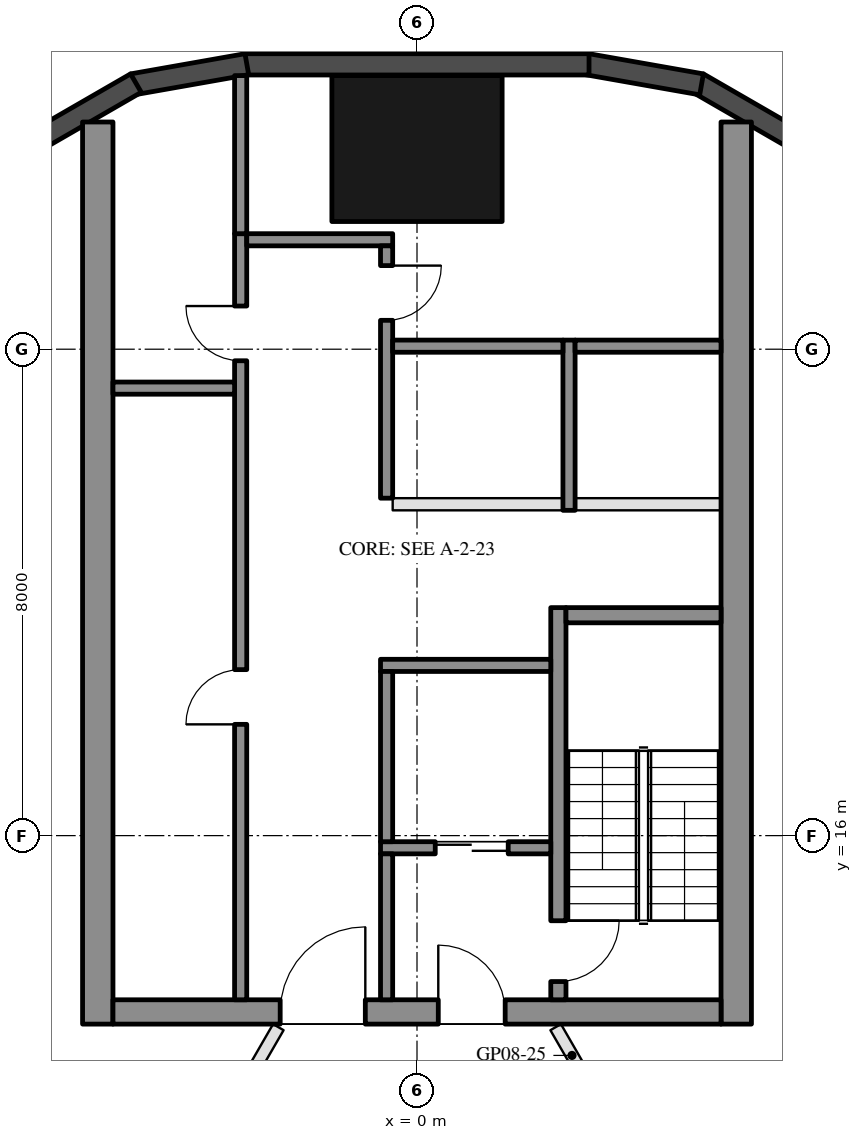
"""IFC4 building model, lengths in metres.
Left out: names, types, materials, properties, quantities, classifications, styles, units other than length and angle.
Written with IfcOpenShell. Run it as: python <this file> out.ifc"""

import sys

from ifc_helpers import new_model, si_unit, direction, frame, frame_2d, origin, origin_2d, place, context, subcontext, project, spatial, rectangle, hollow_rectangle, extrude, element, fill, save


model = new_model("IFC4")
c1 = context("Model", 3, precision=1e-05, world=origin(), true_north=direction((0.0, 1.0)))
c2 = subcontext(c1, "Body", "Model", "MODEL_VIEW")
j1 = project(units=[si_unit("LENGTHUNIT", "METRE"), si_unit("PLANEANGLEUNIT", "RADIAN")], contexts=[c1])
p1 = place(None, origin())
s1 = spatial("IfcSite", under=j1, at=p1, CompositionType="ELEMENT")
p2 = place(p1, origin())
s2 = spatial("IfcBuilding", under=s1, at=p2, CompositionType="ELEMENT")
p3 = place(p2, frame((0.0, 0.0, 105.7)))
s3 = spatial("IfcBuildingStorey", under=s2, at=p3, CompositionType="ELEMENT", Elevation=105.7)
p4 = place(p3, frame((0.0, 27.3, 0.0), z_axis=(0.0, 0.0, 1.0), x_axis=(1.0, 0.0, 0.0)))
e1 = element("IfcColumn", 1, at=p4, inside=s3, PredefinedType="COLUMN", context=c2, shape_type="SweptSolid", body=[
    extrude(hollow_rectangle(XDim=2.8, YDim=2.4, WallThickness=0.07, at=origin_2d()), origin(), (0.0, 0.0, 1.0), 3.7),
])
for number, where, z_axis, x_axis in (
    (2, (6.277, 27.422, 0.0), (0.0, 0.0, 1.0), (-0.866, 0.5, 0.0)),
    (3, (4.68, 28.356, 0.0), (0.0, 0.0, 1.0), (-0.985, 0.174, 0.0)),
):
    element("IfcWall", number, at=place(p3, frame(where, z_axis=z_axis, x_axis=x_axis)), inside=s3, PredefinedType="SOLIDWALL", context=c2, shape_type="SweptSolid", body=[
        extrude(rectangle(XDim=1.91, YDim=0.35, at=frame_2d((0.955, 0.0))), origin(), (0.0, 0.0, 1.0), 3.55),
    ])
p5 = place(p3, frame((2.829, 28.685, 0.0), z_axis=(0.0, 0.0, 1.0), x_axis=(-1.0, 0.0, 0.0)))
e4 = element("IfcWall", 4, at=p5, inside=s3, PredefinedType="SOLIDWALL", context=c2, shape_type="SweptSolid", body=[
    extrude(rectangle(XDim=5.658, YDim=0.35, at=frame_2d((2.829, 0.0))), origin(), (0.0, 0.0, 1.0), 3.55),
])
for number, where, z_axis, x_axis in (
    (5, (-2.799, 28.688, 0.0), (0.0, 0.0, 1.0), (-0.985, -0.174, 0.0)),
    (6, (-4.623, 28.377, 0.0), (0.0, 0.0, 1.0), (-0.866, -0.5, 0.0)),
):
    element("IfcWall", number, at=place(p3, frame(where, z_axis=z_axis, x_axis=x_axis)), inside=s3, PredefinedType="SOLIDWALL", context=c2, shape_type="SweptSolid", body=[
        extrude(rectangle(XDim=1.91, YDim=0.35, at=frame_2d((0.955, 0.0))), origin(), (0.0, 0.0, 1.0), 3.55),
    ])
for number, where, z_axis, x_axis in (
    (7, (5.25, 12.9, 0.0), (0.0, 0.0, 1.0), (0.0, 1.0, 0.0)),
    (8, (-5.25, 12.9, 0.0), (0.0, 0.0, 1.0), (0.0, 1.0, 0.0)),
):
    element("IfcWall", number, at=place(p3, frame(where, z_axis=z_axis, x_axis=x_axis)), inside=s3, PredefinedType="SHEAR", context=c2, shape_type="SweptSolid", body=[
        extrude(rectangle(XDim=14.837, YDim=0.5, at=frame_2d((7.418, 0.0))), origin(), (0.0, 0.0, 1.0), 3.5),
    ])
p6 = place(p3, frame((5.0, 13.1, 0.0), z_axis=(0.0, 0.0, 1.0), x_axis=(-1.0, 0.0, 0.0)))
e9 = element("IfcWall", 9, at=p6, inside=s3, PredefinedType="SHEAR", context=c2, shape_type="SweptSolid", body=[
    extrude(rectangle(XDim=10.0, YDim=0.4, at=frame_2d((5.0, 0.0))), origin(), (0.0, 0.0, 1.0), 3.5),
])
p7 = place(p6, frame((3.55, 0.0, 0.0)))
e10 = element("IfcOpeningElement", 10, at=p7, cuts=e9, PredefinedType="OPENING", context=c2, shape_type="SweptSolid", body=[
    extrude(rectangle(XDim=1.1, YDim=2.1, at=frame_2d((0.55, 1.05))), frame((0.0, 0.21, 0.0), z_axis=(0.0, -1.0, 0.0), x_axis=(1.0, 0.0, 0.0)), (0.0, 0.0, 1.0), 0.42),
])
p8 = place(p6, frame((5.85, 0.0, 0.0)))
e11 = element("IfcOpeningElement", 11, at=p8, cuts=e9, PredefinedType="OPENING", context=c2, shape_type="SweptSolid", body=[
    extrude(rectangle(XDim=1.4, YDim=2.1, at=frame_2d((0.7, 1.05))), frame((0.0, 0.21, 0.0), z_axis=(0.0, -1.0, 0.0), x_axis=(1.0, 0.0, 0.0)), (0.0, 0.0, 1.0), 0.42),
])
p9 = place(p3, frame((2.325, 13.3, 0.0), z_axis=(0.0, 0.0, 1.0), x_axis=(0.0, 1.0, 0.0)))
e12 = element("IfcWall", 12, at=p9, inside=s3, PredefinedType="SHEAR", context=c2, shape_type="SweptSolid", body=[
    extrude(rectangle(XDim=6.45, YDim=0.25, at=frame_2d((3.225, 0.0))), origin(), (0.0, 0.0, 1.0), 3.5),
])
p10 = place(p9, frame((0.3, 0.0, 0.0)))
e13 = element("IfcOpeningElement", 13, at=p10, cuts=e12, PredefinedType="OPENING", context=c2, shape_type="SweptSolid", body=[
    extrude(rectangle(XDim=1.0, YDim=2.1, at=frame_2d((0.5, 1.05))), frame((0.0, 0.135, 0.0), z_axis=(0.0, -1.0, 0.0), x_axis=(1.0, 0.0, 0.0)), (0.0, 0.0, 1.0), 0.27),
])
p11 = place(p3, frame((5.0, 19.625, 0.0), z_axis=(0.0, 0.0, 1.0), x_axis=(-1.0, 0.0, 0.0)))
e14 = element("IfcWall", 14, at=p11, inside=s3, PredefinedType="SHEAR", context=c2, shape_type="SweptSolid", body=[
    extrude(rectangle(XDim=2.55, YDim=0.25, at=frame_2d((1.275, 0.0))), origin(), (0.0, 0.0, 1.0), 3.5),
])
p12 = place(p3, frame((2.2, 18.8, 0.0), z_axis=(0.0, 0.0, 1.0), x_axis=(-1.0, 0.0, 0.0)))
e15 = element("IfcWall", 15, at=p12, inside=s3, PredefinedType="SHEAR", context=c2, shape_type="SweptSolid", body=[
    extrude(rectangle(XDim=2.8, YDim=0.2, at=frame_2d((1.4, 0.0))), origin(), (0.0, 0.0, 1.0), 3.5),
])
p13 = place(p3, frame((2.2, 15.8, 0.0), z_axis=(0.0, 0.0, 1.0), x_axis=(-1.0, 0.0, 0.0)))
e16 = element("IfcWall", 16, at=p13, inside=s3, PredefinedType="SHEAR", context=c2, shape_type="SweptSolid", body=[
    extrude(rectangle(XDim=2.8, YDim=0.2, at=frame_2d((1.4, 0.0))), origin(), (0.0, 0.0, 1.0), 3.5),
])
p14 = place(p13, frame((0.7, 0.0, 0.0)))
e17 = element("IfcOpeningElement", 17, at=p14, cuts=e16, PredefinedType="OPENING", context=c2, shape_type="SweptSolid", body=[
    extrude(rectangle(XDim=1.2, YDim=2.1, at=frame_2d((0.6, 1.05))), frame((0.0, 0.11, 0.0), z_axis=(0.0, -1.0, 0.0), x_axis=(1.0, 0.0, 0.0)), (0.0, 0.0, 1.0), 0.22),
])
p15 = place(p3, frame((-0.5, 15.9, 0.0), z_axis=(0.0, 0.0, 1.0), x_axis=(0.0, 1.0, 0.0)))
e18 = element("IfcWall", 18, at=p15, inside=s3, PredefinedType="SHEAR", context=c2, shape_type="SweptSolid", body=[
    extrude(rectangle(XDim=2.8, YDim=0.2, at=frame_2d((1.4, 0.0))), origin(), (0.0, 0.0, 1.0), 3.5),
])
p16 = place(p3, frame((-0.5, 13.3, 0.0), z_axis=(0.0, 0.0, 1.0), x_axis=(0.0, 1.0, 0.0)))
e19 = element("IfcWall", 19, at=p16, inside=s3, PredefinedType="SHEAR", context=c2, shape_type="SweptSolid", body=[
    extrude(rectangle(XDim=2.4, YDim=0.2, at=frame_2d((1.2, 0.0))), origin(), (0.0, 0.0, 1.0), 3.5),
])
p17 = place(p3, frame((-2.9, 13.3, 0.0), z_axis=(0.0, 0.0, 1.0), x_axis=(0.0, 1.0, 0.0)))
e20 = element("IfcWall", 20, at=p17, inside=s3, PredefinedType="SHEAR", context=c2, shape_type="SweptSolid", body=[
    extrude(rectangle(XDim=12.6, YDim=0.2, at=frame_2d((6.3, 0.0))), origin(), (0.0, 0.0, 1.0), 3.5),
])
p18 = place(p17, frame((4.53, 0.0, 0.0)))
e21 = element("IfcOpeningElement", 21, at=p18, cuts=e20, PredefinedType="OPENING", context=c2, shape_type="SweptSolid", body=[
    extrude(rectangle(XDim=0.9, YDim=2.1, at=frame_2d((0.45, 1.05))), frame((0.0, 0.11, 0.0), z_axis=(0.0, -1.0, 0.0), x_axis=(1.0, 0.0, 0.0)), (0.0, 0.0, 1.0), 0.22),
])
p19 = place(p17, frame((10.51, 0.0, 0.0)))
e22 = element("IfcOpeningElement", 22, at=p19, cuts=e20, PredefinedType="OPENING", context=c2, shape_type="SweptSolid", body=[
    extrude(rectangle(XDim=0.9, YDim=2.1, at=frame_2d((0.45, 1.05))), frame((0.0, 0.11, 0.0), z_axis=(0.0, -1.0, 0.0), x_axis=(1.0, 0.0, 0.0)), (0.0, 0.0, 1.0), 0.22),
])
p20 = place(p3, frame((-0.4, 25.8, 0.0), z_axis=(0.0, 0.0, 1.0), x_axis=(-1.0, 0.0, 0.0)))
e23 = element("IfcWall", 23, at=p20, inside=s3, PredefinedType="SHEAR", context=c2, shape_type="SweptSolid", body=[
    extrude(rectangle(XDim=2.4, YDim=0.2, at=frame_2d((1.2, 0.0))), origin(), (0.0, 0.0, 1.0), 3.5),
])
p21 = place(p3, frame((-0.5, 21.55, 0.0), z_axis=(0.0, 0.0, 1.0), x_axis=(0.0, 1.0, 0.0)))
e24 = element("IfcWall", 24, at=p21, inside=s3, PredefinedType="SHEAR", context=c2, shape_type="SweptSolid", body=[
    extrude(rectangle(XDim=4.15, YDim=0.2, at=frame_2d((2.075, 0.0))), origin(), (0.0, 0.0, 1.0), 3.5),
])
p22 = place(p21, frame((2.925, 0.0, 0.0)))
e25 = element("IfcOpeningElement", 25, at=p22, cuts=e24, PredefinedType="OPENING", context=c2, shape_type="SweptSolid", body=[
    extrude(rectangle(XDim=0.9, YDim=2.1, at=frame_2d((0.45, 1.05))), frame((0.0, 0.11, 0.0), z_axis=(0.0, -1.0, 0.0), x_axis=(1.0, 0.0, 0.0)), (0.0, 0.0, 1.0), 0.22),
])
p23 = place(p3, frame((-3.0, 23.36, 0.0), z_axis=(0.0, 0.0, 1.0), x_axis=(-1.0, 0.0, 0.0)))
e26 = element("IfcWall", 26, at=p23, inside=s3, PredefinedType="SHEAR", context=c2, shape_type="SweptSolid", body=[
    extrude(rectangle(XDim=2.0, YDim=0.2, at=frame_2d((1.0, 0.0))), origin(), (0.0, 0.0, 1.0), 3.5),
])
p24 = place(p3, frame((-2.9, 25.9, 0.0), z_axis=(0.0, 0.0, 1.0), x_axis=(0.0, 1.0, 0.0)))
e27 = element("IfcWall", 27, at=p24, inside=s3, PredefinedType="SHEAR", context=c2, shape_type="SweptSolid", body=[
    extrude(rectangle(XDim=2.6, YDim=0.2, at=frame_2d((1.3, 0.0))), origin(), (0.0, 0.0, 1.0), 3.5),
])
p25 = place(p3, frame((2.5, 21.35, 0.0), z_axis=(0.0, 0.0, 1.0), x_axis=(0.0, 1.0, 0.0)))
e28 = element("IfcWall", 28, at=p25, inside=s3, PredefinedType="SHEAR", context=c2, shape_type="SweptSolid", body=[
    extrude(rectangle(XDim=2.8, YDim=0.2, at=frame_2d((1.4, 0.0))), origin(), (0.0, 0.0, 1.0), 3.5),
])
p26 = place(p3, frame((5.0, 24.05, 0.0), z_axis=(0.0, 0.0, 1.0), x_axis=(-1.0, 0.0, 0.0)))
e29 = element("IfcWall", 29, at=p26, inside=s3, PredefinedType="SHEAR", context=c2, shape_type="SweptSolid", body=[
    extrude(rectangle(XDim=2.4, YDim=0.2, at=frame_2d((1.2, 0.0))), origin(), (0.0, 0.0, 1.0), 3.5),
])
p27 = place(p3, frame((2.4, 24.05, 0.0), z_axis=(0.0, 0.0, 1.0), x_axis=(-1.0, 0.0, 0.0)))
e30 = element("IfcWall", 30, at=p27, inside=s3, PredefinedType="SHEAR", context=c2, shape_type="SweptSolid", body=[
    extrude(rectangle(XDim=2.8, YDim=0.2, at=frame_2d((1.4, 0.0))), origin(), (0.0, 0.0, 1.0), 3.5),
])
p28 = place(p3, frame((5.0, 21.45, 0.0), z_axis=(0.0, 0.0, 1.0), x_axis=(-1.0, 0.0, 0.0)))
e31 = element("IfcWall", 31, at=p28, inside=s3, PredefinedType="PARTITIONING", context=c2, shape_type="SweptSolid", body=[
    extrude(rectangle(XDim=2.4, YDim=0.2, at=frame_2d((1.2, 0.0))), origin(), (0.0, 0.0, 1.0), 3.5),
])
p29 = place(p3, frame((2.4, 21.45, 0.0), z_axis=(0.0, 0.0, 1.0), x_axis=(-1.0, 0.0, 0.0)))
e32 = element("IfcWall", 32, at=p29, inside=s3, PredefinedType="PARTITIONING", context=c2, shape_type="SweptSolid", body=[
    extrude(rectangle(XDim=2.8, YDim=0.2, at=frame_2d((1.4, 0.0))), origin(), (0.0, 0.0, 1.0), 3.5),
])
p30 = place(p3, frame((14.722, 13.061, 0.0), z_axis=(0.0, 0.0, 1.0), x_axis=(-0.9249494111, -0.380090235214, 0.0)))
e33 = element("IfcWall", 33, at=p30, inside=s3, PredefinedType="PARTITIONING", context=c2, shape_type="SweptSolid", body=[
    extrude(rectangle(XDim=11.079, YDim=0.2, at=frame_2d((5.54, 0.0))), origin(), (0.0, 0.0, 1.0), 2.95),
])
p31 = place(p3, frame((-13.953, 12.593, 0.0), z_axis=(0.0, 0.0, 1.0), x_axis=(0.854198088033, -0.519947715065, 0.0)))
e34 = element("IfcWall", 34, at=p31, inside=s3, PredefinedType="PARTITIONING", context=c2, shape_type="SweptSolid", body=[
    extrude(rectangle(XDim=10.083, YDim=0.2, at=frame_2d((5.041, 0.0))), origin(), (0.0, 0.0, 1.0), 2.95),
])
p32 = place(p3, frame((2.281, 12.85, 0.0), z_axis=(0.0, 0.0, 1.0), x_axis=(0.499977539641, -0.866038370891, 0.0)))
e35 = element("IfcWall", 35, at=p32, inside=s3, PredefinedType="PARTITIONING", context=c2, shape_type="SweptSolid", body=[
    extrude(rectangle(XDim=4.474, YDim=0.2, at=frame_2d((2.237, 0.0))), origin(), (0.0, 0.0, 1.0), 2.95),
])
p33 = place(p32, frame((1.737, 0.0, 0.0)))
e36 = element("IfcOpeningElement", 36, at=p33, cuts=e35, PredefinedType="OPENING", context=c2, shape_type="SweptSolid", body=[
    extrude(rectangle(XDim=1.0, YDim=2.1, at=frame_2d((0.5, 1.05))), frame((0.0, 0.11, 0.0), z_axis=(0.0, -1.0, 0.0), x_axis=(1.0, 0.0, 0.0)), (0.0, 0.0, 1.0), 0.22),
])
p34 = place(p3, frame((-5.376, 7.489, 0.0), z_axis=(0.0, 0.0, 1.0), x_axis=(0.499998977725, 0.866025993994, 0.0)))
e37 = element("IfcWall", 37, at=p34, inside=s3, PredefinedType="PARTITIONING", context=c2, shape_type="SweptSolid", body=[
    extrude(rectangle(XDim=6.19, YDim=0.2, at=frame_2d((3.095, 0.0))), origin(), (0.0, 0.0, 1.0), 2.95),
])
p35 = place(p34, frame((2.595, 0.0, 0.0)))
e38 = element("IfcOpeningElement", 38, at=p35, cuts=e37, PredefinedType="OPENING", context=c2, shape_type="SweptSolid", body=[
    extrude(rectangle(XDim=1.0, YDim=2.1, at=frame_2d((0.5, 1.05))), frame((0.0, 0.11, 0.0), z_axis=(0.0, -1.0, 0.0), x_axis=(1.0, 0.0, 0.0)), (0.0, 0.0, 1.0), 0.22),
])
p36 = place(p14, origin())
e39 = element("IfcDoor", 39, at=p36, inside=s3, OperationType="DOUBLE_DOOR_SLIDING", PredefinedType="DOOR", context=c2, shape_type="SweptSolid", body=[
    extrude(rectangle(XDim=1.2, YDim=2.1, at=frame_2d((0.6, 1.05))), frame((0.0, 0.025, 0.0), z_axis=(0.0, -1.0, 0.0), x_axis=(1.0, 0.0, 0.0)), (0.0, 0.0, 1.0), 0.05),
])
fill(e17, e39)
p37 = place(p18, origin())
e40 = element("IfcDoor", 40, at=p37, inside=s3, OperationType="SINGLE_SWING_LEFT", PredefinedType="DOOR", context=c2, shape_type="SweptSolid", body=[
    extrude(rectangle(XDim=0.9, YDim=2.1, at=frame_2d((0.45, 1.05))), frame((0.0, 0.025, 0.0), z_axis=(0.0, -1.0, 0.0), x_axis=(1.0, 0.0, 0.0)), (0.0, 0.0, 1.0), 0.05),
])
fill(e21, e40)
p38 = place(p19, origin())
e41 = element("IfcDoor", 41, at=p38, inside=s3, OperationType="SINGLE_SWING_RIGHT", PredefinedType="DOOR", context=c2, shape_type="SweptSolid", body=[
    extrude(rectangle(XDim=0.9, YDim=2.1, at=frame_2d((0.45, 1.05))), frame((0.0, 0.025, 0.0), z_axis=(0.0, -1.0, 0.0), x_axis=(1.0, 0.0, 0.0)), (0.0, 0.0, 1.0), 0.05),
])
fill(e22, e41)
p39 = place(p22, frame((0.9, 0.0, 0.0), z_axis=(0.0, 0.0, 1.0), x_axis=(-1.0, 0.0, 0.0)))
e42 = element("IfcDoor", 42, at=p39, inside=s3, OperationType="SINGLE_SWING_LEFT", PredefinedType="DOOR", context=c2, shape_type="SweptSolid", body=[
    extrude(rectangle(XDim=0.9, YDim=2.1, at=frame_2d((0.45, 1.05))), frame((0.0, 0.025, 0.0), z_axis=(0.0, -1.0, 0.0), x_axis=(1.0, 0.0, 0.0)), (0.0, 0.0, 1.0), 0.05),
])
fill(e25, e42)
p40 = place(p7, frame((1.1, 0.0, 0.0), z_axis=(0.0, 0.0, 1.0), x_axis=(-1.0, 0.0, 0.0)))
e43 = element("IfcDoor", 43, at=p40, inside=s3, OperationType="SINGLE_SWING_LEFT", PredefinedType="DOOR", context=c2, shape_type="SweptSolid", body=[
    extrude(rectangle(XDim=1.1, YDim=2.1, at=frame_2d((0.55, 1.05))), frame((0.0, 0.025, 0.0), z_axis=(0.0, -1.0, 0.0), x_axis=(1.0, 0.0, 0.0)), (0.0, 0.0, 1.0), 0.05),
])
fill(e10, e43)
p41 = place(p8, frame((1.4, 0.0, 0.0), z_axis=(0.0, 0.0, 1.0), x_axis=(-1.0, 0.0, 0.0)))
e44 = element("IfcDoor", 44, at=p41, inside=s3, OperationType="DOUBLE_DOOR_SINGLE_SWING", PredefinedType="DOOR", context=c2, shape_type="SweptSolid", body=[
    extrude(rectangle(XDim=1.4, YDim=2.1, at=frame_2d((0.7, 1.05))), frame((0.0, 0.025, 0.0), z_axis=(0.0, -1.0, 0.0), x_axis=(1.0, 0.0, 0.0)), (0.0, 0.0, 1.0), 0.05),
])
fill(e11, e44)
p42 = place(p10, frame((1.0, 0.0, 0.0), z_axis=(0.0, 0.0, 1.0), x_axis=(-1.0, 0.0, 0.0)))
e45 = element("IfcDoor", 45, at=p42, inside=s3, OperationType="SINGLE_SWING_LEFT", PredefinedType="DOOR", context=c2, shape_type="SweptSolid", body=[
    extrude(rectangle(XDim=1.0, YDim=2.1, at=frame_2d((0.5, 1.05))), frame((0.0, 0.025, 0.0), z_axis=(0.0, -1.0, 0.0), x_axis=(1.0, 0.0, 0.0)), (0.0, 0.0, 1.0), 0.05),
])
fill(e13, e45)
save(model, sys.argv[1])
